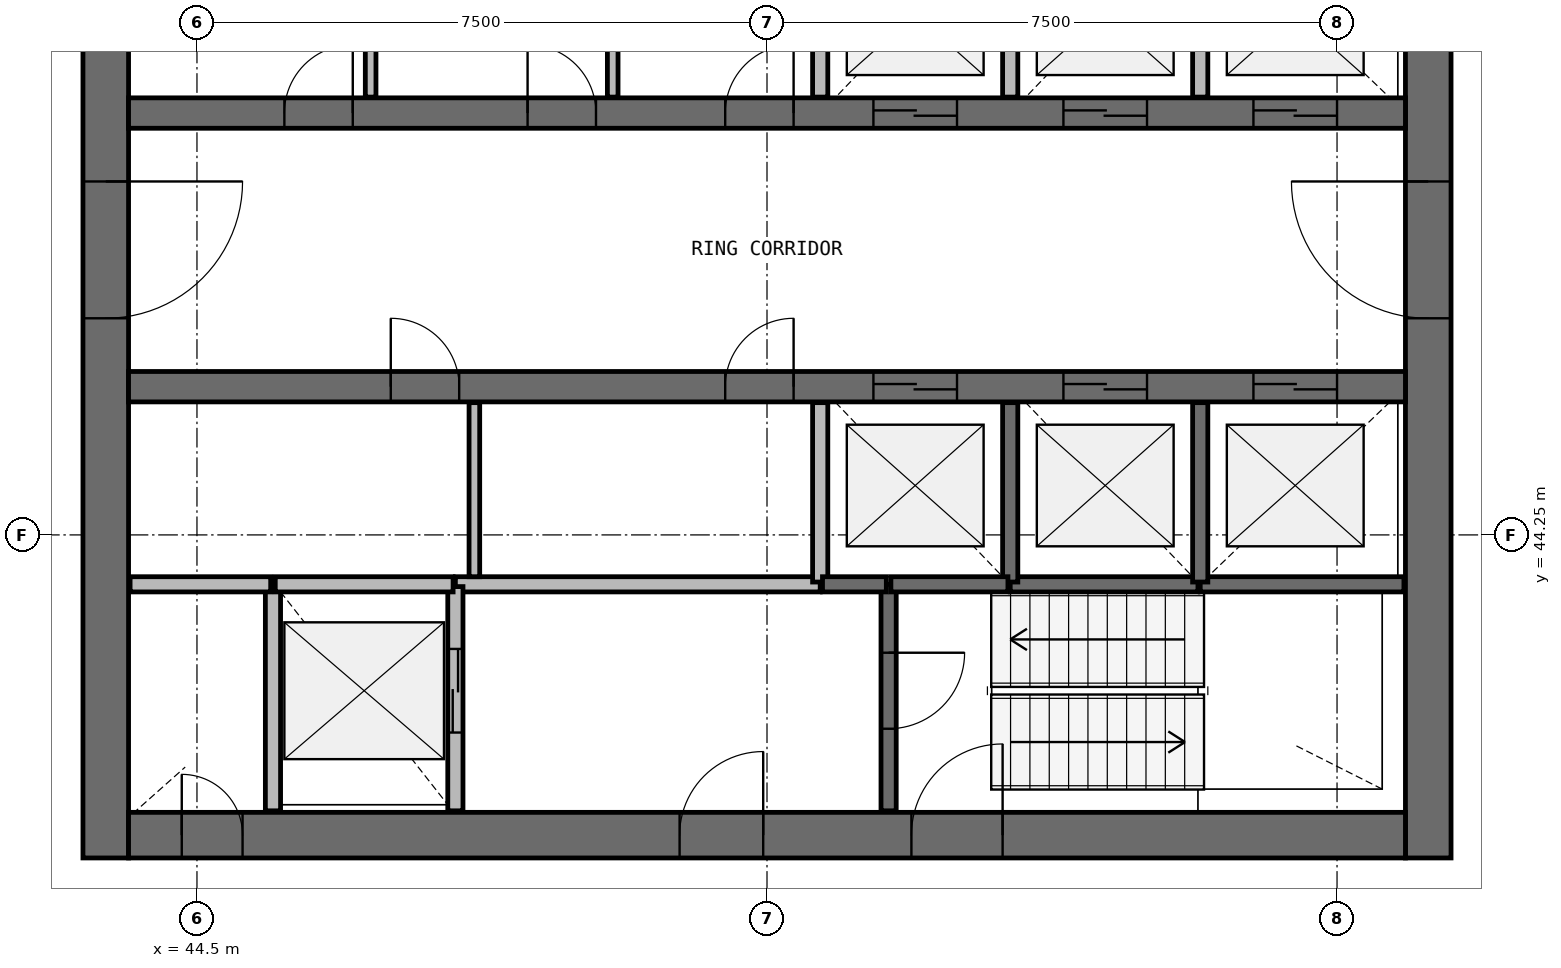
"""IFC4 building model, lengths in metres.
Left out: names, types, materials, properties, quantities, classifications, styles, units other than length and angle.
Written with IfcOpenShell. Run it as: python <this file> out.ifc"""

import sys

from ifc_helpers import new_model, si_unit, direction, frame, frame_2d, origin, place, context, subcontext, project, spatial, rectangle, extrude, source, transform, mapped, element, fill, save


model = new_model("IFC4")
c1 = context("Model", 3, precision=1e-05, world=origin(), true_north=direction((0.0, 1.0)))
c2 = subcontext(c1, "Body", "Model", "MODEL_VIEW")
j1 = project(units=[si_unit("LENGTHUNIT", "METRE"), si_unit("PLANEANGLEUNIT", "RADIAN")], contexts=[c1])
p1 = place(None, origin())
s1 = spatial("IfcSite", under=j1, at=p1, CompositionType="ELEMENT")
p2 = place(p1, origin())
s2 = spatial("IfcBuilding", under=s1, at=p2, CompositionType="ELEMENT")
p3 = place(p2, frame((0.0, 0.0, 215.0)))
s3 = spatial("IfcBuildingStorey", under=s2, at=p3, CompositionType="ELEMENT", Elevation=215.0)
p4 = place(p3, frame((60.7, 40.0, 0.0), z_axis=(0.0, 0.0, 1.0), x_axis=(0.0, 1.0, 0.0)))
e1 = element("IfcWall", 1, at=p4, inside=s3, PredefinedType="SHEAR", context=c2, shape_type="SweptSolid", body=[
    extrude(rectangle(XDim=16.0, YDim=0.6, at=frame_2d((8.0, 0.0))), origin(), (0.0, 0.0, 1.0), 3.9),
])
p5 = place(p4, frame((7.1, 0.0, 0.0)))
e2 = element("IfcOpeningElement", 2, at=p5, cuts=e1, PredefinedType="OPENING", context=c2, shape_type="SweptSolid", body=[
    extrude(rectangle(XDim=1.8, YDim=2.1, at=frame_2d((0.9, 1.05))), frame((0.0, 0.31, 0.0), z_axis=(0.0, -1.0, 0.0), x_axis=(1.0, 0.0, 0.0)), (0.0, 0.0, 1.0), 0.62),
])
p6 = place(p3, frame((43.3, 56.0, 0.0), z_axis=(0.0, 0.0, 1.0), x_axis=(0.0, -1.0, 0.0)))
e3 = element("IfcWall", 3, at=p6, inside=s3, PredefinedType="SHEAR", context=c2, shape_type="SweptSolid", body=[
    extrude(rectangle(XDim=16.0, YDim=0.6, at=frame_2d((8.0, 0.0))), origin(), (0.0, 0.0, 1.0), 3.9),
])
p7 = place(p6, frame((7.1, 0.0, 0.0)))
e4 = element("IfcOpeningElement", 4, at=p7, cuts=e3, PredefinedType="OPENING", context=c2, shape_type="SweptSolid", body=[
    extrude(rectangle(XDim=1.8, YDim=2.1, at=frame_2d((0.9, 1.05))), frame((0.0, 0.31, 0.0), z_axis=(0.0, -1.0, 0.0), x_axis=(1.0, 0.0, 0.0)), (0.0, 0.0, 1.0), 0.62),
])
p8 = place(p3, frame((43.6, 40.3, 0.0), z_axis=(0.0, 0.0, 1.0), x_axis=(1.0, 0.0, 0.0)))
e5 = element("IfcWall", 5, at=p8, inside=s3, PredefinedType="SHEAR", context=c2, shape_type="SweptSolid", body=[
    extrude(rectangle(XDim=16.8, YDim=0.6, at=frame_2d((8.4, 0.0))), origin(), (0.0, 0.0, 1.0), 3.9),
])
p9 = place(p8, frame((10.3, 0.0, 0.0)))
e6 = element("IfcOpeningElement", 6, at=p9, cuts=e5, PredefinedType="OPENING", context=c2, shape_type="SweptSolid", body=[
    extrude(rectangle(XDim=1.2, YDim=2.1, at=frame_2d((0.6, 1.05))), frame((0.0, 0.31, 0.0), z_axis=(0.0, -1.0, 0.0), x_axis=(1.0, 0.0, 0.0)), (0.0, 0.0, 1.0), 0.62),
])
p10 = place(p8, frame((7.25, 0.0, 0.0)))
e7 = element("IfcOpeningElement", 7, at=p10, cuts=e5, PredefinedType="OPENING", context=c2, shape_type="SweptSolid", body=[
    extrude(rectangle(XDim=1.1, YDim=2.1, at=frame_2d((0.55, 1.05))), frame((0.0, 0.31, 0.0), z_axis=(0.0, -1.0, 0.0), x_axis=(1.0, 0.0, 0.0)), (0.0, 0.0, 1.0), 0.62),
])
p11 = place(p8, frame((0.7, 0.0, 0.0)))
e8 = element("IfcOpeningElement", 8, at=p11, cuts=e5, PredefinedType="OPENING", context=c2, shape_type="SweptSolid", body=[
    extrude(rectangle(XDim=0.8, YDim=2.1, at=frame_2d((0.4, 1.05))), frame((0.0, 0.31, 0.0), z_axis=(0.0, -1.0, 0.0), x_axis=(1.0, 0.0, 0.0)), (0.0, 0.0, 1.0), 0.62),
])
p12 = place(p3, frame((43.6, 49.8, 0.0), z_axis=(0.0, 0.0, 1.0), x_axis=(1.0, 0.0, 0.0)))
e9 = element("IfcWall", 9, at=p12, inside=s3, PredefinedType="SHEAR", context=c2, shape_type="SweptSolid", body=[
    extrude(rectangle(XDim=16.8, YDim=0.4, at=frame_2d((8.4, 0.0))), origin(), (0.0, 0.0, 1.0), 3.9),
])
p13 = place(p12, frame((9.8, 0.0, 0.0)))
e10 = element("IfcOpeningElement", 10, at=p13, cuts=e9, PredefinedType="OPENING", context=c2, shape_type="SweptSolid", body=[
    extrude(rectangle(XDim=1.1, YDim=2.1, at=frame_2d((0.55, 1.05))), frame((0.0, 0.21, 0.0), z_axis=(0.0, -1.0, 0.0), x_axis=(1.0, 0.0, 0.0)), (0.0, 0.0, 1.0), 0.42),
])
p14 = place(p12, frame((12.3, 0.0, 0.0)))
e11 = element("IfcOpeningElement", 11, at=p14, cuts=e9, PredefinedType="OPENING", context=c2, shape_type="SweptSolid", body=[
    extrude(rectangle(XDim=1.1, YDim=2.1, at=frame_2d((0.55, 1.05))), frame((0.0, 0.21, 0.0), z_axis=(0.0, -1.0, 0.0), x_axis=(1.0, 0.0, 0.0)), (0.0, 0.0, 1.0), 0.42),
])
p15 = place(p12, frame((14.8, 0.0, 0.0)))
e12 = element("IfcOpeningElement", 12, at=p15, cuts=e9, PredefinedType="OPENING", context=c2, shape_type="SweptSolid", body=[
    extrude(rectangle(XDim=1.1, YDim=2.1, at=frame_2d((0.55, 1.05))), frame((0.0, 0.21, 0.0), z_axis=(0.0, -1.0, 0.0), x_axis=(1.0, 0.0, 0.0)), (0.0, 0.0, 1.0), 0.42),
])
p16 = place(p12, frame((2.05, 0.0, 0.0)))
e13 = element("IfcOpeningElement", 13, at=p16, cuts=e9, PredefinedType="OPENING", context=c2, shape_type="SweptSolid", body=[
    extrude(rectangle(XDim=0.9, YDim=2.1, at=frame_2d((0.45, 1.05))), frame((0.0, 0.21, 0.0), z_axis=(0.0, -1.0, 0.0), x_axis=(1.0, 0.0, 0.0)), (0.0, 0.0, 1.0), 0.42),
])
p17 = place(p12, frame((5.25, 0.0, 0.0)))
e14 = element("IfcOpeningElement", 14, at=p17, cuts=e9, PredefinedType="OPENING", context=c2, shape_type="SweptSolid", body=[
    extrude(rectangle(XDim=0.9, YDim=2.1, at=frame_2d((0.45, 1.05))), frame((0.0, 0.21, 0.0), z_axis=(0.0, -1.0, 0.0), x_axis=(1.0, 0.0, 0.0)), (0.0, 0.0, 1.0), 0.42),
])
p18 = place(p12, frame((7.85, 0.0, 0.0)))
e15 = element("IfcOpeningElement", 15, at=p18, cuts=e9, PredefinedType="OPENING", context=c2, shape_type="SweptSolid", body=[
    extrude(rectangle(XDim=0.9, YDim=2.1, at=frame_2d((0.45, 1.05))), frame((0.0, 0.21, 0.0), z_axis=(0.0, -1.0, 0.0), x_axis=(1.0, 0.0, 0.0)), (0.0, 0.0, 1.0), 0.42),
])
p19 = place(p3, frame((43.6, 46.2, 0.0), z_axis=(0.0, 0.0, 1.0), x_axis=(1.0, 0.0, 0.0)))
e16 = element("IfcWall", 16, at=p19, inside=s3, PredefinedType="SHEAR", context=c2, shape_type="SweptSolid", body=[
    extrude(rectangle(XDim=16.8, YDim=0.4, at=frame_2d((8.4, 0.0))), origin(), (0.0, 0.0, 1.0), 3.9),
])
p20 = place(p19, frame((9.8, 0.0, 0.0)))
e17 = element("IfcOpeningElement", 17, at=p20, cuts=e16, PredefinedType="OPENING", context=c2, shape_type="SweptSolid", body=[
    extrude(rectangle(XDim=1.1, YDim=2.1, at=frame_2d((0.55, 1.05))), frame((0.0, 0.21, 0.0), z_axis=(0.0, -1.0, 0.0), x_axis=(1.0, 0.0, 0.0)), (0.0, 0.0, 1.0), 0.42),
])
p21 = place(p19, frame((12.3, 0.0, 0.0)))
e18 = element("IfcOpeningElement", 18, at=p21, cuts=e16, PredefinedType="OPENING", context=c2, shape_type="SweptSolid", body=[
    extrude(rectangle(XDim=1.1, YDim=2.1, at=frame_2d((0.55, 1.05))), frame((0.0, 0.21, 0.0), z_axis=(0.0, -1.0, 0.0), x_axis=(1.0, 0.0, 0.0)), (0.0, 0.0, 1.0), 0.42),
])
p22 = place(p19, frame((14.8, 0.0, 0.0)))
e19 = element("IfcOpeningElement", 19, at=p22, cuts=e16, PredefinedType="OPENING", context=c2, shape_type="SweptSolid", body=[
    extrude(rectangle(XDim=1.1, YDim=2.1, at=frame_2d((0.55, 1.05))), frame((0.0, 0.21, 0.0), z_axis=(0.0, -1.0, 0.0), x_axis=(1.0, 0.0, 0.0)), (0.0, 0.0, 1.0), 0.42),
])
p23 = place(p19, frame((3.45, 0.0, 0.0)))
e20 = element("IfcOpeningElement", 20, at=p23, cuts=e16, PredefinedType="OPENING", context=c2, shape_type="SweptSolid", body=[
    extrude(rectangle(XDim=0.9, YDim=2.1, at=frame_2d((0.45, 1.05))), frame((0.0, 0.21, 0.0), z_axis=(0.0, -1.0, 0.0), x_axis=(1.0, 0.0, 0.0)), (0.0, 0.0, 1.0), 0.42),
])
p24 = place(p19, frame((7.85, 0.0, 0.0)))
e21 = element("IfcOpeningElement", 21, at=p24, cuts=e16, PredefinedType="OPENING", context=c2, shape_type="SweptSolid", body=[
    extrude(rectangle(XDim=0.9, YDim=2.1, at=frame_2d((0.45, 1.05))), frame((0.0, 0.21, 0.0), z_axis=(0.0, -1.0, 0.0), x_axis=(1.0, 0.0, 0.0)), (0.0, 0.0, 1.0), 0.42),
])
p25 = place(p3, frame((52.7, 43.6, 0.0), z_axis=(0.0, 0.0, 1.0), x_axis=(-1.0, 0.0, 0.0)))
e22 = element("IfcWall", 22, at=p25, inside=s3, PredefinedType="SOLIDWALL", context=c2, shape_type="SweptSolid", body=[
    extrude(rectangle(XDim=4.8, YDim=0.2, at=frame_2d((2.4, 0.0))), origin(), (0.0, 0.0, 1.0), 3.58),
])
p26 = place(p3, frame((45.5, 43.6, 0.0), z_axis=(0.0, 0.0, 1.0), x_axis=(0.0, -1.0, 0.0)))
e23 = element("IfcWall", 23, at=p26, inside=s3, PredefinedType="SOLIDWALL", context=c2, shape_type="SweptSolid", body=[
    extrude(rectangle(XDim=2.98, YDim=0.2, at=frame_2d((1.49, 0.0))), origin(), (0.0, 0.0, 1.0), 3.58),
])
p27 = place(p3, frame((47.9, 40.62, 0.0), z_axis=(0.0, 0.0, 1.0), x_axis=(0.0, 1.0, 0.0)))
e24 = element("IfcWall", 24, at=p27, inside=s3, PredefinedType="SOLIDWALL", context=c2, shape_type="SweptSolid", body=[
    extrude(rectangle(XDim=2.95, YDim=0.2, at=frame_2d((1.475, 0.0))), origin(), (0.0, 0.0, 1.0), 3.58),
])
p28 = place(p27, frame((1.03, 0.0, 0.0)))
e25 = element("IfcOpeningElement", 25, at=p28, cuts=e24, PredefinedType="OPENING", context=c2, shape_type="SweptSolid", body=[
    extrude(rectangle(XDim=1.1, YDim=2.1, at=frame_2d((0.55, 1.05))), frame((0.0, 0.11, 0.0), z_axis=(0.0, -1.0, 0.0), x_axis=(1.0, 0.0, 0.0)), (0.0, 0.0, 1.0), 0.22),
])
p29 = place(p3, frame((53.6, 43.6, 0.0), z_axis=(0.0, 0.0, 1.0), x_axis=(0.0, -1.0, 0.0)))
e26 = element("IfcWall", 26, at=p29, inside=s3, PredefinedType="SOLIDWALL", context=c2, shape_type="SweptSolid", body=[
    extrude(rectangle(XDim=2.98, YDim=0.2, at=frame_2d((1.49, 0.0))), origin(), (0.0, 0.0, 1.0), 3.58),
])
p30 = place(p29, frame((0.9, 0.0, 0.0)))
e27 = element("IfcOpeningElement", 27, at=p30, cuts=e26, PredefinedType="OPENING", context=c2, shape_type="SweptSolid", body=[
    extrude(rectangle(XDim=1.0, YDim=2.1, at=frame_2d((0.5, 1.05))), frame((0.0, 0.11, 0.0), z_axis=(0.0, -1.0, 0.0), x_axis=(1.0, 0.0, 0.0)), (0.0, 0.0, 1.0), 0.22),
])
p31 = place(p3, frame((57.7, 43.6, 0.0), z_axis=(0.0, 0.0, 1.0), x_axis=(1.0, 0.0, 0.0)))
e28 = element("IfcWall", 28, at=p31, inside=s3, PredefinedType="SOLIDWALL", context=c2, shape_type="SweptSolid", body=[
    extrude(rectangle(XDim=2.68, YDim=0.2, at=frame_2d((1.34, 0.0))), origin(), (0.0, 0.0, 1.0), 3.58),
])
p32 = place(p3, frame((55.2, 43.6, 0.0), z_axis=(0.0, 0.0, 1.0), x_axis=(1.0, 0.0, 0.0)))
e29 = element("IfcWall", 29, at=p32, inside=s3, PredefinedType="SOLIDWALL", context=c2, shape_type="SweptSolid", body=[
    extrude(rectangle(XDim=2.47, YDim=0.2, at=frame_2d((1.235, 0.0))), origin(), (0.0, 0.0, 1.0), 3.58),
])
p33 = place(p3, frame((47.87, 43.6, 0.0), z_axis=(0.0, 0.0, 1.0), x_axis=(-1.0, 0.0, 0.0)))
e30 = element("IfcWall", 30, at=p33, inside=s3, PredefinedType="SOLIDWALL", context=c2, shape_type="SweptSolid", body=[
    extrude(rectangle(XDim=2.34, YDim=0.2, at=frame_2d((1.17, 0.0))), origin(), (0.0, 0.0, 1.0), 3.58),
])
for number, where, z_axis, x_axis in (
    (31, (52.7, 45.99, 0.0), (0.0, 0.0, 1.0), (0.0, -1.0, 0.0)),
    (32, (52.7, 52.37, 0.0), (0.0, 0.0, 1.0), (0.0, -1.0, 0.0)),
    (33, (55.2, 43.63, 0.0), (0.0, 0.0, 1.0), (0.0, 1.0, 0.0)),
    (34, (55.2, 50.01, 0.0), (0.0, 0.0, 1.0), (0.0, 1.0, 0.0)),
    (35, (57.7, 43.63, 0.0), (0.0, 0.0, 1.0), (0.0, 1.0, 0.0)),
):
    element("IfcWall", number, at=place(p3, frame(where, z_axis=z_axis, x_axis=x_axis)), inside=s3, PredefinedType="SOLIDWALL", context=c2, shape_type="SweptSolid", body=[
        extrude(rectangle(XDim=2.36, YDim=0.2, at=frame_2d((1.18, 0.0))), origin(), (0.0, 0.0, 1.0), 3.58),
    ])
p34 = place(p3, frame((57.7, 50.01, 0.0), z_axis=(0.0, 0.0, 1.0), x_axis=(0.0, 1.0, 0.0)))
e36 = element("IfcWall", 36, at=p34, inside=s3, PredefinedType="SOLIDWALL", context=c2, shape_type="SweptSolid", body=[
    extrude(rectangle(XDim=2.39, YDim=0.2, at=frame_2d((1.195, 0.0))), origin(), (0.0, 0.0, 1.0), 3.58),
])
p35 = place(p3, frame((45.47, 43.6, 0.0), z_axis=(0.0, 0.0, 1.0), x_axis=(-1.0, 0.0, 0.0)))
e37 = element("IfcWall", 37, at=p35, inside=s3, PredefinedType="SOLIDWALL", context=c2, shape_type="SweptSolid", body=[
    extrude(rectangle(XDim=1.85, YDim=0.2, at=frame_2d((0.925, 0.0))), origin(), (0.0, 0.0, 1.0), 3.58),
])
p36 = place(p3, frame((53.63, 43.6, 0.0), z_axis=(0.0, 0.0, 1.0), x_axis=(1.0, 0.0, 0.0)))
e38 = element("IfcWall", 38, at=p36, inside=s3, PredefinedType="SOLIDWALL", context=c2, shape_type="SweptSolid", body=[
    extrude(rectangle(XDim=1.54, YDim=0.2, at=frame_2d((0.77, 0.0))), origin(), (0.0, 0.0, 1.0), 3.58),
])
p37 = place(p3, frame((52.73, 43.6, 0.0), z_axis=(0.0, 0.0, 1.0), x_axis=(1.0, 0.0, 0.0)))
e39 = element("IfcWall", 39, at=p37, inside=s3, PredefinedType="SOLIDWALL", context=c2, shape_type="SweptSolid", body=[
    extrude(rectangle(XDim=0.84, YDim=0.2, at=frame_2d((0.42, 0.0))), origin(), (0.0, 0.0, 1.0), 3.58),
])
for number, where, z_axis, x_axis in (
    (40, (46.785, 50.01, 0.0), (0.0, 0.0, 1.0), (0.0, 1.0, 0.0)),
    (41, (48.15, 43.7, 0.0), (0.0, 0.0, 1.0), (0.0, 1.0, 0.0)),
    (42, (49.97, 50.01, 0.0), (0.0, 0.0, 1.0), (0.0, 1.0, 0.0)),
):
    element("IfcWall", number, at=place(p3, frame(where, z_axis=z_axis, x_axis=x_axis)), inside=s3, PredefinedType="PARTITIONING", context=c2, shape_type="SweptSolid", body=[
        extrude(rectangle(XDim=2.29, YDim=0.14, at=frame_2d((1.145, 0.0))), origin(), (0.0, 0.0, 1.0), 2.88),
    ])
m1 = source(origin(), c2, "Body", "SweptSolid", [
    extrude(rectangle(XDim=1.8, YDim=2.1, at=frame_2d((0.9, 1.05))), frame((0.0, 0.025, 0.0), z_axis=(0.0, -1.0, 0.0), x_axis=(1.0, 0.0, 0.0)), (0.0, 0.0, 1.0), 0.05),
])
p38 = place(p7, origin())
e43 = element("IfcDoor", 43, at=p38, inside=s3, OperationType="SINGLE_SWING_LEFT", PredefinedType="DOOR", context=c2, shape_type="MappedRepresentation", body=[
    mapped(m1, transform((0.0, 0.0, 0.0), scale=1.0)),
])
fill(e4, e43)
p39 = place(p5, origin())
e44 = element("IfcDoor", 44, at=p39, inside=s3, OperationType="SINGLE_SWING_RIGHT", PredefinedType="DOOR", context=c2, shape_type="MappedRepresentation", body=[
    mapped(m1, transform((0.0, 0.0, 0.0), scale=1.0)),
])
fill(e2, e44)
m2 = source(origin(), c2, "Body", "SweptSolid", [
    extrude(rectangle(XDim=1.1, YDim=2.1, at=frame_2d((0.55, 1.05))), frame((0.0, 0.025, 0.0), z_axis=(0.0, -1.0, 0.0), x_axis=(1.0, 0.0, 0.0)), (0.0, 0.0, 1.0), 0.05),
])
p40 = place(p13, origin())
e45 = element("IfcDoor", 45, at=p40, inside=s3, OperationType="DOUBLE_DOOR_SLIDING", PredefinedType="USERDEFINED", context=c2, shape_type="MappedRepresentation", body=[
    mapped(m2, transform((0.0, 0.0, 0.0), scale=1.0)),
])
fill(e10, e45)
p41 = place(p14, origin())
e46 = element("IfcDoor", 46, at=p41, inside=s3, OperationType="DOUBLE_DOOR_SLIDING", PredefinedType="USERDEFINED", context=c2, shape_type="MappedRepresentation", body=[
    mapped(m2, transform((0.0, 0.0, 0.0), scale=1.0)),
])
fill(e11, e46)
p42 = place(p15, origin())
e47 = element("IfcDoor", 47, at=p42, inside=s3, OperationType="DOUBLE_DOOR_SLIDING", PredefinedType="USERDEFINED", context=c2, shape_type="MappedRepresentation", body=[
    mapped(m2, transform((0.0, 0.0, 0.0), scale=1.0)),
])
fill(e12, e47)
p43 = place(p20, origin())
e48 = element("IfcDoor", 48, at=p43, inside=s3, OperationType="DOUBLE_DOOR_SLIDING", PredefinedType="USERDEFINED", context=c2, shape_type="MappedRepresentation", body=[
    mapped(m2, transform((0.0, 0.0, 0.0), scale=1.0)),
])
fill(e17, e48)
p44 = place(p21, origin())
e49 = element("IfcDoor", 49, at=p44, inside=s3, OperationType="DOUBLE_DOOR_SLIDING", PredefinedType="USERDEFINED", context=c2, shape_type="MappedRepresentation", body=[
    mapped(m2, transform((0.0, 0.0, 0.0), scale=1.0)),
])
fill(e18, e49)
p45 = place(p22, origin())
e50 = element("IfcDoor", 50, at=p45, inside=s3, OperationType="DOUBLE_DOOR_SLIDING", PredefinedType="USERDEFINED", context=c2, shape_type="MappedRepresentation", body=[
    mapped(m2, transform((0.0, 0.0, 0.0), scale=1.0)),
])
fill(e19, e50)
p46 = place(p28, origin())
e51 = element("IfcDoor", 51, at=p46, inside=s3, OperationType="DOUBLE_DOOR_SLIDING", PredefinedType="USERDEFINED", context=c2, shape_type="MappedRepresentation", body=[
    mapped(m2, transform((0.0, 0.0, 0.0), scale=1.0)),
])
fill(e25, e51)
m3 = source(origin(), c2, "Body", "SweptSolid", [
    extrude(rectangle(XDim=1.2, YDim=2.1, at=frame_2d((0.6, 1.05))), frame((0.0, 0.025, 0.0), z_axis=(0.0, -1.0, 0.0), x_axis=(1.0, 0.0, 0.0)), (0.0, 0.0, 1.0), 0.05),
])
p47 = place(p9, origin())
e52 = element("IfcDoor", 52, at=p47, inside=s3, OperationType="SINGLE_SWING_RIGHT", PredefinedType="DOOR", context=c2, shape_type="MappedRepresentation", body=[
    mapped(m3, transform((0.0, 0.0, 0.0), scale=1.0)),
])
fill(e6, e52)
m4 = source(origin(), c2, "Body", "SweptSolid", [
    extrude(rectangle(XDim=1.0, YDim=2.1, at=frame_2d((0.5, 1.05))), frame((0.0, 0.025, 0.0), z_axis=(0.0, -1.0, 0.0), x_axis=(1.0, 0.0, 0.0)), (0.0, 0.0, 1.0), 0.05),
])
p48 = place(p30, origin())
e53 = element("IfcDoor", 53, at=p48, inside=s3, OperationType="SINGLE_SWING_LEFT", PredefinedType="DOOR", context=c2, shape_type="MappedRepresentation", body=[
    mapped(m4, transform((0.0, 0.0, 0.0), scale=1.0)),
])
fill(e27, e53)
m5 = source(origin(), c2, "Body", "SweptSolid", [
    extrude(rectangle(XDim=1.1, YDim=2.1, at=frame_2d((0.55, 1.05))), frame((0.0, 0.025, 0.0), z_axis=(0.0, -1.0, 0.0), x_axis=(1.0, 0.0, 0.0)), (0.0, 0.0, 1.0), 0.05),
])
p49 = place(p10, origin())
e54 = element("IfcDoor", 54, at=p49, inside=s3, OperationType="SINGLE_SWING_RIGHT", PredefinedType="DOOR", context=c2, shape_type="MappedRepresentation", body=[
    mapped(m5, transform((0.0, 0.0, 0.0), scale=1.0)),
])
fill(e7, e54)
m6 = source(origin(), c2, "Body", "SweptSolid", [
    extrude(rectangle(XDim=0.8, YDim=2.1, at=frame_2d((0.4, 1.05))), frame((0.0, 0.025, 0.0), z_axis=(0.0, -1.0, 0.0), x_axis=(1.0, 0.0, 0.0)), (0.0, 0.0, 1.0), 0.05),
])
p50 = place(p11, origin())
e55 = element("IfcDoor", 55, at=p50, inside=s3, OperationType="SINGLE_SWING_LEFT", PredefinedType="DOOR", context=c2, shape_type="MappedRepresentation", body=[
    mapped(m6, transform((0.0, 0.0, 0.0), scale=1.0)),
])
fill(e8, e55)
m7 = source(origin(), c2, "Body", "SweptSolid", [
    extrude(rectangle(XDim=0.9, YDim=2.1, at=frame_2d((0.45, 1.05))), frame((0.0, 0.025, 0.0), z_axis=(0.0, -1.0, 0.0), x_axis=(1.0, 0.0, 0.0)), (0.0, 0.0, 1.0), 0.05),
])
p51 = place(p16, origin())
e56 = element("IfcDoor", 56, at=p51, inside=s3, OperationType="SINGLE_SWING_RIGHT", PredefinedType="DOOR", context=c2, shape_type="MappedRepresentation", body=[
    mapped(m7, transform((0.0, 0.0, 0.0), scale=1.0)),
])
fill(e13, e56)
p52 = place(p17, origin())
e57 = element("IfcDoor", 57, at=p52, inside=s3, OperationType="SINGLE_SWING_LEFT", PredefinedType="DOOR", context=c2, shape_type="MappedRepresentation", body=[
    mapped(m7, transform((0.0, 0.0, 0.0), scale=1.0)),
])
fill(e14, e57)
p53 = place(p18, origin())
e58 = element("IfcDoor", 58, at=p53, inside=s3, OperationType="SINGLE_SWING_RIGHT", PredefinedType="DOOR", context=c2, shape_type="MappedRepresentation", body=[
    mapped(m7, transform((0.0, 0.0, 0.0), scale=1.0)),
])
fill(e15, e58)
p54 = place(p23, origin())
e59 = element("IfcDoor", 59, at=p54, inside=s3, OperationType="SINGLE_SWING_LEFT", PredefinedType="DOOR", context=c2, shape_type="MappedRepresentation", body=[
    mapped(m7, transform((0.0, 0.0, 0.0), scale=1.0)),
])
fill(e20, e59)
p55 = place(p24, origin())
e60 = element("IfcDoor", 60, at=p55, inside=s3, OperationType="SINGLE_SWING_RIGHT", PredefinedType="DOOR", context=c2, shape_type="MappedRepresentation", body=[
    mapped(m7, transform((0.0, 0.0, 0.0), scale=1.0)),
])
fill(e21, e60)
save(model, sys.argv[1])
